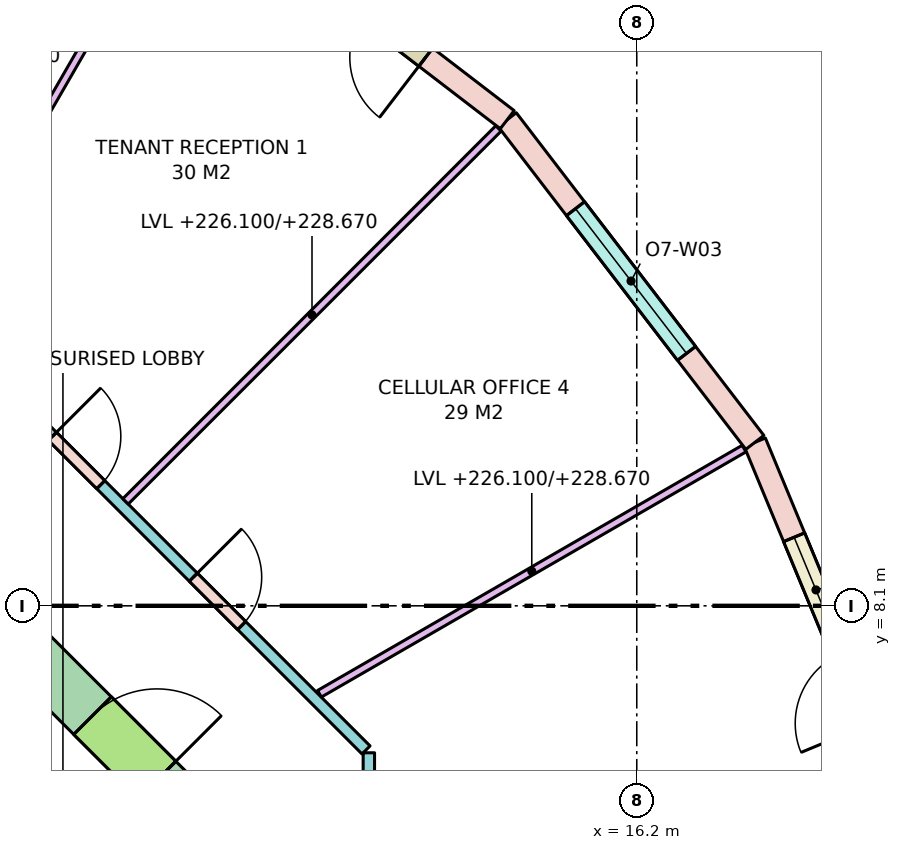
"""IFC4 building model, lengths in metres.
Left out: names, types, materials, properties, quantities, classifications, styles, units other than length and angle.
Written with IfcOpenShell. Run it as: python <this file> out.ifc"""

import sys

from ifc_helpers import new_model, si_unit, direction, frame, frame_2d, origin, place, context, subcontext, project, spatial, rectangle, extrude, element, fill, save


model = new_model("IFC4")
c1 = context("Model", 3, precision=1e-05, world=origin(), true_north=direction((0.0, 1.0)))
c2 = subcontext(c1, "Body", "Model", "MODEL_VIEW")
j1 = project(units=[si_unit("LENGTHUNIT", "METRE"), si_unit("PLANEANGLEUNIT", "RADIAN")], contexts=[c1])
p1 = place(None, origin())
s1 = spatial("IfcSite", under=j1, at=p1, CompositionType="ELEMENT")
p2 = place(p1, origin())
s2 = spatial("IfcBuilding", under=s1, at=p2, CompositionType="ELEMENT")
p3 = place(p2, frame((0.0, 0.0, 226.1)))
s3 = spatial("IfcBuildingStorey", under=s2, at=p3, CompositionType="ELEMENT", Elevation=226.1)
p4 = place(p3, frame((7.347, 8.347, -0.28), z_axis=(0.0, 0.0, 1.0), x_axis=(0.707106781187, -0.707106781187, 0.0)))
e1 = element("IfcWall", 1, at=p4, inside=s3, PredefinedType="SHEAR", context=c2, shape_type="SweptSolid", body=[
    extrude(rectangle(XDim=4.243, YDim=0.7, at=frame_2d((2.121, 0.0))), origin(), (0.0, 0.0, 1.0), 3.7),
])
p5 = place(p4, frame((2.393, 0.0, 0.28)))
e2 = element("IfcOpeningElement", 2, at=p5, cuts=e1, PredefinedType="OPENING", context=c2, shape_type="SweptSolid", body=[
    extrude(rectangle(XDim=1.2, YDim=2.1, at=frame_2d((0.6, 1.05))), frame((0.0, 0.36, 0.0), z_axis=(0.0, -1.0, 0.0), x_axis=(1.0, 0.0, 0.0)), (0.0, 0.0, 1.0), 0.72),
])
p6 = place(p3, frame((19.802, 5.306, 0.0), z_axis=(0.0, 0.0, 1.0), x_axis=(-0.382713071139, 0.923867255172, 0.0)))
e3 = element("IfcWall", 3, at=p6, inside=s3, PredefinedType="STANDARD", context=c2, shape_type="SweptSolid", body=[
    extrude(rectangle(XDim=5.352, YDim=0.3, at=frame_2d((2.676, 0.0))), origin(), (0.0, 0.0, 1.0), 3.42),
])
p7 = place(p6, frame((1.351, 0.0, 0.0)))
e4 = element("IfcOpeningElement", 4, at=p7, cuts=e3, PredefinedType="OPENING", context=c2, shape_type="SweptSolid", body=[
    extrude(rectangle(XDim=1.0, YDim=2.4, at=frame_2d((0.5, 1.2))), frame((0.0, 0.16, 0.0), z_axis=(0.0, -1.0, 0.0), x_axis=(1.0, 0.0, 0.0)), (0.0, 0.0, 1.0), 0.32),
])
p8 = place(p6, frame((2.501, 0.0, 0.8)))
e5 = element("IfcOpeningElement", 5, at=p8, cuts=e3, PredefinedType="OPENING", context=c2, shape_type="SweptSolid", body=[
    extrude(rectangle(XDim=1.5, YDim=2.4, at=frame_2d((0.75, 1.2))), frame((0.0, 0.16, 0.0), z_axis=(0.0, -1.0, 0.0), x_axis=(1.0, 0.0, 0.0)), (0.0, 0.0, 1.0), 0.32),
])
p9 = place(p3, frame((17.753, 10.25, 0.0), z_axis=(0.0, 0.0, 1.0), x_axis=(-0.60876670321, 0.793349293227, 0.0)))
e6 = element("IfcWall", 6, at=p9, inside=s3, PredefinedType="STANDARD", context=c2, shape_type="SweptSolid", body=[
    extrude(rectangle(XDim=5.352, YDim=0.3, at=frame_2d((2.676, 0.0))), origin(), (0.0, 0.0, 1.0), 3.42),
])
p10 = place(p9, frame((1.476, 0.0, 0.8)))
e7 = element("IfcOpeningElement", 7, at=p10, cuts=e6, PredefinedType="OPENING", context=c2, shape_type="SweptSolid", body=[
    extrude(rectangle(XDim=2.4, YDim=2.4, at=frame_2d((1.2, 1.2))), frame((0.0, 0.16, 0.0), z_axis=(0.0, -1.0, 0.0), x_axis=(1.0, 0.0, 0.0)), (0.0, 0.0, 1.0), 0.32),
])
p11 = place(p3, frame((14.496, 14.496, 0.0), z_axis=(0.0, 0.0, 1.0), x_axis=(-0.793349293227, 0.60876670321, 0.0)))
e8 = element("IfcWall", 8, at=p11, inside=s3, PredefinedType="STANDARD", context=c2, shape_type="SweptSolid", body=[
    extrude(rectangle(XDim=5.352, YDim=0.3, at=frame_2d((2.676, 0.0))), origin(), (0.0, 0.0, 1.0), 3.42),
])
p12 = place(p11, frame((1.351, 0.0, 0.0)))
e9 = element("IfcOpeningElement", 9, at=p12, cuts=e8, PredefinedType="OPENING", context=c2, shape_type="SweptSolid", body=[
    extrude(rectangle(XDim=1.0, YDim=2.4, at=frame_2d((0.5, 1.2))), frame((0.0, 0.16, 0.0), z_axis=(0.0, -1.0, 0.0), x_axis=(1.0, 0.0, 0.0)), (0.0, 0.0, 1.0), 0.32),
])
p13 = place(p11, frame((2.501, 0.0, 0.8)))
e10 = element("IfcOpeningElement", 10, at=p13, cuts=e8, PredefinedType="OPENING", context=c2, shape_type="SweptSolid", body=[
    extrude(rectangle(XDim=1.5, YDim=2.4, at=frame_2d((0.75, 1.2))), frame((0.0, 0.16, 0.0), z_axis=(0.0, -1.0, 0.0), x_axis=(1.0, 0.0, 0.0)), (0.0, 0.0, 1.0), 0.32),
])
p14 = place(p3, frame((8.204, 10.638, 0.0), z_axis=(0.0, 0.0, 1.0), x_axis=(0.707106781187, -0.707106781187, 0.0)))
e11 = element("IfcWall", 11, at=p14, inside=s3, PredefinedType="PARTITIONING", context=c2, shape_type="SweptSolid", body=[
    extrude(rectangle(XDim=6.271, YDim=0.15, at=frame_2d((3.135, 0.0))), origin(), (0.0, 0.0, 1.0), 2.57),
])
p15 = place(p14, frame((3.057, 0.0, 0.0)))
e12 = element("IfcOpeningElement", 12, at=p15, cuts=e11, PredefinedType="OPENING", context=c2, shape_type="SweptSolid", body=[
    extrude(rectangle(XDim=0.9, YDim=2.1, at=frame_2d((0.45, 1.05))), frame((0.0, 0.085, 0.0), z_axis=(0.0, -1.0, 0.0), x_axis=(1.0, 0.0, 0.0)), (0.0, 0.0, 1.0), 0.17),
])
p16 = place(p14, frame((0.436, 0.0, 0.0)))
e13 = element("IfcOpeningElement", 13, at=p16, cuts=e11, PredefinedType="OPENING", context=c2, shape_type="SweptSolid", body=[
    extrude(rectangle(XDim=0.9, YDim=2.1, at=frame_2d((0.45, 1.05))), frame((0.0, 0.085, 0.0), z_axis=(0.0, -1.0, 0.0), x_axis=(1.0, 0.0, 0.0)), (0.0, 0.0, 1.0), 0.17),
])
p17 = place(p3, frame((12.675, 6.167, 0.0), z_axis=(0.0, 0.0, 1.0), x_axis=(0.0, -1.0, 0.0)))
e14 = element("IfcWall", 14, at=p17, inside=s3, PredefinedType="PARTITIONING", context=c2, shape_type="SweptSolid", body=[
    extrude(rectangle(XDim=12.333, YDim=0.15, at=frame_2d((6.167, 0.0))), origin(), (0.0, 0.0, 1.0), 2.57),
])
p18 = place(p17, frame((10.473, 0.0, 0.0)))
e15 = element("IfcOpeningElement", 15, at=p18, cuts=e14, PredefinedType="OPENING", context=c2, shape_type="SweptSolid", body=[
    extrude(rectangle(XDim=0.9, YDim=2.1, at=frame_2d((0.45, 1.05))), frame((0.0, 0.085, 0.0), z_axis=(0.0, -1.0, 0.0), x_axis=(1.0, 0.0, 0.0)), (0.0, 0.0, 1.0), 0.17),
])
p19 = place(p17, frame((7.416, 0.0, 0.0)))
e16 = element("IfcOpeningElement", 16, at=p19, cuts=e14, PredefinedType="OPENING", context=c2, shape_type="SweptSolid", body=[
    extrude(rectangle(XDim=0.9, YDim=2.1, at=frame_2d((0.45, 1.05))), frame((0.0, 0.085, 0.0), z_axis=(0.0, -1.0, 0.0), x_axis=(1.0, 0.0, 0.0)), (0.0, 0.0, 1.0), 0.17),
])
p20 = place(p17, frame((2.208, 0.0, 0.0)))
e17 = element("IfcOpeningElement", 17, at=p20, cuts=e14, PredefinedType="OPENING", context=c2, shape_type="SweptSolid", body=[
    extrude(rectangle(XDim=1.8, YDim=2.1, at=frame_2d((0.9, 1.05))), frame((0.0, 0.085, 0.0), z_axis=(0.0, -1.0, 0.0), x_axis=(1.0, 0.0, 0.0)), (0.0, 0.0, 1.0), 0.17),
])
p21 = place(p3, frame((12.025, 6.943, 0.0), z_axis=(0.0, 0.0, 1.0), x_axis=(0.866026773083, 0.499997628298, 0.0)))
e18 = element("IfcWall", 18, at=p21, inside=s3, PredefinedType="PARTITIONING", context=c2, shape_type="SweptSolid", body=[
    extrude(rectangle(XDim=6.451, YDim=0.1, at=frame_2d((3.226, 0.0))), origin(), (0.0, 0.0, 1.0), 2.57),
])
p22 = place(p3, frame((9.474, 9.474, 0.0), z_axis=(0.0, 0.0, 1.0), x_axis=(0.707106781187, 0.707106781187, 0.0)))
e19 = element("IfcWall", 19, at=p22, inside=s3, PredefinedType="PARTITIONING", context=c2, shape_type="SweptSolid", body=[
    extrude(rectangle(XDim=6.938, YDim=0.1, at=frame_2d((3.469, 0.0))), origin(), (0.0, 0.0, 1.0), 2.57),
])
p23 = place(p3, frame((6.221, 10.775, 0.0), z_axis=(0.0, 0.0, 1.0), x_axis=(0.500016891966, 0.866015650984, 0.0)))
e20 = element("IfcWall", 20, at=p23, inside=s3, PredefinedType="PARTITIONING", context=c2, shape_type="SweptSolid", body=[
    extrude(rectangle(XDim=7.895, YDim=0.1, at=frame_2d((3.948, 0.0))), origin(), (0.0, 0.0, 1.0), 2.57),
])
p24 = place(p8, origin())
e21 = element("IfcWindow", 21, at=p24, inside=s3, PartitioningType="SINGLE_PANEL", PredefinedType="WINDOW", context=c2, shape_type="SweptSolid", body=[
    extrude(rectangle(XDim=1.5, YDim=2.4, at=frame_2d((0.75, 1.2))), frame((0.0, 0.03, 0.0), z_axis=(0.0, -1.0, 0.0), x_axis=(1.0, 0.0, 0.0)), (0.0, 0.0, 1.0), 0.06),
])
fill(e5, e21)
p25 = place(p10, origin())
e22 = element("IfcWindow", 22, at=p25, inside=s3, PartitioningType="SINGLE_PANEL", PredefinedType="WINDOW", context=c2, shape_type="SweptSolid", body=[
    extrude(rectangle(XDim=2.4, YDim=2.4, at=frame_2d((1.2, 1.2))), frame((0.0, 0.03, 0.0), z_axis=(0.0, -1.0, 0.0), x_axis=(1.0, 0.0, 0.0)), (0.0, 0.0, 1.0), 0.06),
])
fill(e7, e22)
p26 = place(p12, origin())
e23 = element("IfcDoor", 23, at=p26, inside=s3, OperationType="SINGLE_SWING_LEFT", PredefinedType="DOOR", context=c2, shape_type="SweptSolid", body=[
    extrude(rectangle(XDim=1.0, YDim=2.4, at=frame_2d((0.5, 1.2))), frame((0.0, 0.025, 0.0), z_axis=(0.0, -1.0, 0.0), x_axis=(1.0, 0.0, 0.0)), (0.0, 0.0, 1.0), 0.05),
])
fill(e9, e23)
p27 = place(p5, origin())
e24 = element("IfcDoor", 24, at=p27, inside=s3, OperationType="SINGLE_SWING_RIGHT", PredefinedType="DOOR", context=c2, shape_type="SweptSolid", body=[
    extrude(rectangle(XDim=1.2, YDim=2.1, at=frame_2d((0.6, 1.05))), frame((0.0, 0.025, 0.0), z_axis=(0.0, -1.0, 0.0), x_axis=(1.0, 0.0, 0.0)), (0.0, 0.0, 1.0), 0.05),
])
fill(e2, e24)
p28 = place(p15, origin())
e25 = element("IfcDoor", 25, at=p28, inside=s3, OperationType="SINGLE_SWING_LEFT", PredefinedType="DOOR", context=c2, shape_type="SweptSolid", body=[
    extrude(rectangle(XDim=0.9, YDim=2.1, at=frame_2d((0.45, 1.05))), frame((0.0, 0.025, 0.0), z_axis=(0.0, -1.0, 0.0), x_axis=(1.0, 0.0, 0.0)), (0.0, 0.0, 1.0), 0.05),
])
fill(e12, e25)
p29 = place(p16, origin())
e26 = element("IfcDoor", 26, at=p29, inside=s3, OperationType="SINGLE_SWING_LEFT", PredefinedType="DOOR", context=c2, shape_type="SweptSolid", body=[
    extrude(rectangle(XDim=0.9, YDim=2.1, at=frame_2d((0.45, 1.05))), frame((0.0, 0.025, 0.0), z_axis=(0.0, -1.0, 0.0), x_axis=(1.0, 0.0, 0.0)), (0.0, 0.0, 1.0), 0.05),
])
fill(e13, e26)
save(model, sys.argv[1])
